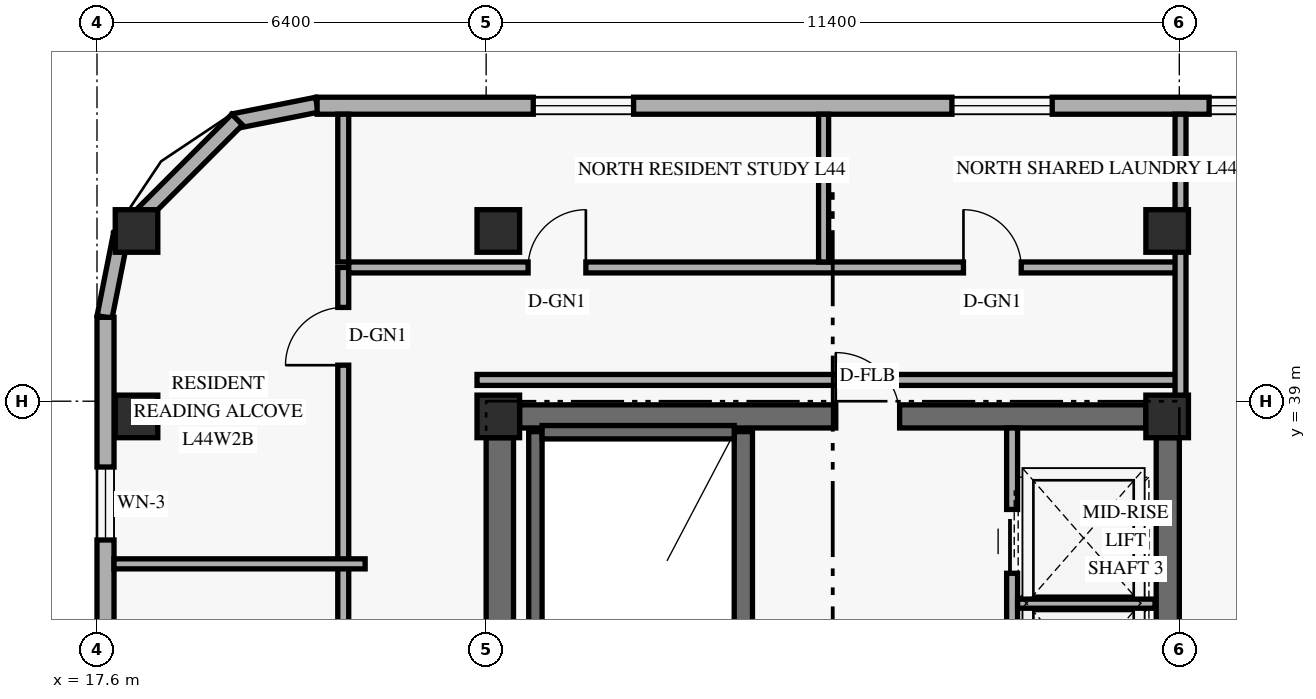
"""IFC4 building model, lengths in metres.
Left out: names, types, materials, properties, quantities, classifications, styles, units other than length and angle.
Written with IfcOpenShell. Run it as: python <this file> out.ifc"""

import sys

from ifc_helpers import new_model, si_unit, direction, frame, frame_2d, origin, origin_2d, place, context, subcontext, project, spatial, rectangle, extrude, element, fill, save


model = new_model("IFC4")
c1 = context("Model", 3, precision=1e-05, world=origin(), true_north=direction((0.0, 1.0)))
c2 = subcontext(c1, "Body", "Model", "MODEL_VIEW")
j1 = project(units=[si_unit("LENGTHUNIT", "METRE"), si_unit("PLANEANGLEUNIT", "RADIAN")], contexts=[c1])
p1 = place(None, origin())
s1 = spatial("IfcSite", under=j1, at=p1, CompositionType="ELEMENT")
p2 = place(p1, origin())
s2 = spatial("IfcBuilding", under=s1, at=p2, CompositionType="ELEMENT")
p3 = place(p2, frame((0.0, 0.0, 169.8)))
s3 = spatial("IfcBuildingStorey", under=s2, at=p3, CompositionType="ELEMENT", Elevation=169.8)
p4 = place(p3, frame((24.225, 30.55, 0.0), z_axis=(0.0, 0.0, 1.0), x_axis=(0.0, 1.0, 0.0)))
e1 = element("IfcWall", 1, at=p4, inside=s3, PredefinedType="SHEAR", context=c2, shape_type="SweptSolid", body=[
    extrude(rectangle(XDim=7.85, YDim=0.45, at=frame_2d((3.925, 0.0))), origin(), (0.0, 0.0, 1.0), 2.738),
])
p5 = place(p3, frame((35.21, 31.35, 0.0), z_axis=(0.0, 0.0, 1.0), x_axis=(0.0, 1.0, 0.0)))
e2 = element("IfcWall", 2, at=p5, inside=s3, PredefinedType="SHEAR", context=c2, shape_type="SweptSolid", body=[
    extrude(rectangle(XDim=7.05, YDim=0.38, at=frame_2d((3.525, 0.0))), origin(), (0.0, 0.0, 1.0), 2.738),
])
p6 = place(p3, frame((24.55, 38.75, 0.0), z_axis=(0.0, 0.0, 1.0), x_axis=(1.0, 0.0, 0.0)))
e3 = element("IfcWall", 3, at=p6, inside=s3, PredefinedType="SHEAR", context=c2, shape_type="SweptSolid", body=[
    extrude(rectangle(XDim=10.3, YDim=0.38, at=frame_2d((5.15, 0.0))), origin(), (0.0, 0.0, 1.0), 3.35),
])
p7 = place(p6, frame((5.2, 0.0, 0.0)))
e4 = element("IfcOpeningElement", 4, at=p7, cuts=e3, PredefinedType="OPENING", context=c2, shape_type="SweptSolid", body=[
    extrude(rectangle(XDim=1.05, YDim=2.15, at=frame_2d((0.525, 1.075))), frame((0.0, 0.2, 0.0), z_axis=(0.0, -1.0, 0.0), x_axis=(1.0, 0.0, 0.0)), (0.0, 0.0, 1.0), 0.4),
])
p8 = place(p3, frame((24.81, 30.74, 0.0), z_axis=(0.0, 0.0, 1.0), x_axis=(0.0, 1.0, 0.0)))
e5 = element("IfcWall", 5, at=p8, inside=s3, PredefinedType="SHEAR", context=c2, shape_type="SweptSolid", body=[
    extrude(rectangle(XDim=7.76, YDim=0.22, at=frame_2d((3.88, 0.0))), origin(), (0.0, 0.0, 1.0), 3.35),
])
p9 = place(p3, frame((28.23, 30.74, 0.0), z_axis=(0.0, 0.0, 1.0), x_axis=(0.0, 1.0, 0.0)))
e6 = element("IfcWall", 6, at=p9, inside=s3, PredefinedType="SHEAR", context=c2, shape_type="SweptSolid", body=[
    extrude(rectangle(XDim=7.76, YDim=0.3, at=frame_2d((3.88, 0.0))), origin(), (0.0, 0.0, 1.0), 3.35),
])
p10 = place(p3, frame((24.92, 38.49, 0.0), z_axis=(0.0, 0.0, 1.0), x_axis=(1.0, 0.0, 0.0)))
e7 = element("IfcWall", 7, at=p10, inside=s3, PredefinedType="SHEAR", context=c2, shape_type="SweptSolid", body=[
    extrude(rectangle(XDim=3.16, YDim=0.22, at=frame_2d((1.58, 0.0))), origin(), (0.0, 0.0, 1.0), 3.35),
])
for number, where, z_axis, x_axis in (
    (8, (18.25, 38.75, 0.0), (0.0, 0.0, 1.0), (1.0, 0.0, 0.0)),
    (9, (18.25, 41.8, 0.0), (0.0, 0.0, 1.0), (1.0, 0.0, 0.0)),
    (10, (24.2, 38.75, 0.0), (0.0, 0.0, 1.0), (1.0, 0.0, 0.0)),
    (11, (24.2, 41.8, 0.0), (0.0, 0.0, 1.0), (1.0, 0.0, 0.0)),
    (12, (35.2, 38.75, 0.0), (0.0, 0.0, 1.0), (1.0, 0.0, 0.0)),
    (13, (35.2, 41.8, 0.0), (0.0, 0.0, 1.0), (1.0, 0.0, 0.0)),
):
    element("IfcColumn", number, at=place(p3, frame(where, z_axis=z_axis, x_axis=x_axis)), inside=s3, PredefinedType="COLUMN", context=c2, shape_type="SweptSolid", body=[
        extrude(rectangle(XDim=0.7, YDim=0.7, at=origin_2d()), origin(), (0.0, 0.0, 1.0), 3.6),
    ])
p11 = place(p3, frame((21.217, 43.876, 0.0), z_axis=(0.0, 0.0, 1.0), x_axis=(-0.980809899341, -0.19496651342, 0.0)))
e14 = element("IfcWall", 14, at=p11, inside=s3, PredefinedType="SOLIDWALL", context=c2, shape_type="SweptSolid", body=[
    extrude(rectangle(XDim=1.389, YDim=0.25, at=frame_2d((0.694, 0.0))), origin(), (0.0, 0.0, 1.0), 3.35),
])
p12 = place(p3, frame((19.905, 43.632, 0.0), z_axis=(0.0, 0.0, 1.0), x_axis=(-0.707106781187, -0.707106781187, 0.0)))
e15 = element("IfcWall", 15, at=p12, inside=s3, PredefinedType="SOLIDWALL", context=c2, shape_type="SweptSolid", body=[
    extrude(rectangle(XDim=2.739, YDim=0.25, at=frame_2d((1.37, 0.0))), origin(), (0.0, 0.0, 1.0), 3.35),
])
p13 = place(p3, frame((17.995, 41.746, 0.0), z_axis=(0.0, 0.0, 1.0), x_axis=(-0.195135625965, -0.9807762678, 0.0)))
e16 = element("IfcWall", 16, at=p13, inside=s3, PredefinedType="SOLIDWALL", context=c2, shape_type="SweptSolid", body=[
    extrude(rectangle(XDim=1.389, YDim=0.25, at=frame_2d((0.694, 0.0))), origin(), (0.0, 0.0, 1.0), 3.35),
])
p14 = place(p3, frame((54.98, 43.86, 0.0), z_axis=(0.0, 0.0, 1.0), x_axis=(-1.0, 0.0, 0.0)))
e17 = element("IfcWall", 17, at=p14, inside=s3, PredefinedType="SOLIDWALL", context=c2, shape_type="SweptSolid", body=[
    extrude(rectangle(XDim=33.76, YDim=0.28, at=frame_2d((16.88, 0.0))), origin(), (0.0, 0.0, 1.0), 3.35),
])
p15 = place(p14, frame((28.555, 0.0, 0.85)))
e18 = element("IfcOpeningElement", 18, at=p15, cuts=e17, PredefinedType="OPENING", context=c2, shape_type="SweptSolid", body=[
    extrude(rectangle(XDim=1.65, YDim=1.6, at=frame_2d((0.825, 0.8))), frame((0.0, 0.15, 0.0), z_axis=(0.0, -1.0, 0.0), x_axis=(1.0, 0.0, 0.0)), (0.0, 0.0, 1.0), 0.3),
])
p16 = place(p14, frame((21.67, 0.0, 0.85)))
e19 = element("IfcOpeningElement", 19, at=p16, cuts=e17, PredefinedType="OPENING", context=c2, shape_type="SweptSolid", body=[
    extrude(rectangle(XDim=1.65, YDim=1.6, at=frame_2d((0.825, 0.8))), frame((0.0, 0.15, 0.0), z_axis=(0.0, -1.0, 0.0), x_axis=(1.0, 0.0, 0.0)), (0.0, 0.0, 1.0), 0.3),
])
p17 = place(p14, frame((17.44, 0.0, 0.85)))
e20 = element("IfcOpeningElement", 20, at=p17, cuts=e17, PredefinedType="OPENING", context=c2, shape_type="SweptSolid", body=[
    extrude(rectangle(XDim=1.65, YDim=1.6, at=frame_2d((0.825, 0.8))), frame((0.0, 0.15, 0.0), z_axis=(0.0, -1.0, 0.0), x_axis=(1.0, 0.0, 0.0)), (0.0, 0.0, 1.0), 0.3),
])
p18 = place(p14, frame((13.245, 0.0, 0.85)))
e21 = element("IfcOpeningElement", 21, at=p18, cuts=e17, PredefinedType="OPENING", context=c2, shape_type="SweptSolid", body=[
    extrude(rectangle(XDim=1.65, YDim=1.6, at=frame_2d((0.825, 0.8))), frame((0.0, 0.15, 0.0), z_axis=(0.0, -1.0, 0.0), x_axis=(1.0, 0.0, 0.0)), (0.0, 0.0, 1.0), 0.3),
])
p19 = place(p14, frame((7.85, 0.0, 0.85)))
e22 = element("IfcOpeningElement", 22, at=p19, cuts=e17, PredefinedType="OPENING", context=c2, shape_type="SweptSolid", body=[
    extrude(rectangle(XDim=1.65, YDim=1.6, at=frame_2d((0.825, 0.8))), frame((0.0, 0.15, 0.0), z_axis=(0.0, -1.0, 0.0), x_axis=(1.0, 0.0, 0.0)), (0.0, 0.0, 1.0), 0.3),
])
p20 = place(p14, frame((4.68, 0.0, 0.85)))
e23 = element("IfcOpeningElement", 23, at=p20, cuts=e17, PredefinedType="OPENING", context=c2, shape_type="SweptSolid", body=[
    extrude(rectangle(XDim=1.2, YDim=1.5, at=frame_2d((0.6, 0.75))), frame((0.0, 0.15, 0.0), z_axis=(0.0, -1.0, 0.0), x_axis=(1.0, 0.0, 0.0)), (0.0, 0.0, 1.0), 0.3),
])
p21 = place(p14, frame((1.365, 0.0, 0.85)))
e24 = element("IfcOpeningElement", 24, at=p21, cuts=e17, PredefinedType="OPENING", context=c2, shape_type="SweptSolid", body=[
    extrude(rectangle(XDim=1.65, YDim=1.6, at=frame_2d((0.825, 0.8))), frame((0.0, 0.15, 0.0), z_axis=(0.0, -1.0, 0.0), x_axis=(1.0, 0.0, 0.0)), (0.0, 0.0, 1.0), 0.3),
])
p22 = place(p3, frame((17.74, 40.38, 0.0), z_axis=(0.0, 0.0, 1.0), x_axis=(0.0, -1.0, 0.0)))
e25 = element("IfcWall", 25, at=p22, inside=s3, PredefinedType="SOLIDWALL", context=c2, shape_type="SweptSolid", body=[
    extrude(rectangle(XDim=32.76, YDim=0.28, at=frame_2d((16.38, 0.0))), origin(), (0.0, 0.0, 1.0), 3.35),
])
p23 = place(p22, frame((26.623, 0.0, 0.85)))
e26 = element("IfcOpeningElement", 26, at=p23, cuts=e25, PredefinedType="OPENING", context=c2, shape_type="SweptSolid", body=[
    extrude(rectangle(XDim=1.8, YDim=1.6, at=frame_2d((0.9, 0.8))), frame((0.0, 0.15, 0.0), z_axis=(0.0, -1.0, 0.0), x_axis=(1.0, 0.0, 0.0)), (0.0, 0.0, 1.0), 0.3),
])
p24 = place(p22, frame((16.085, 0.0, 0.85)))
e27 = element("IfcOpeningElement", 27, at=p24, cuts=e25, PredefinedType="OPENING", context=c2, shape_type="SweptSolid", body=[
    extrude(rectangle(XDim=1.8, YDim=1.6, at=frame_2d((0.9, 0.8))), frame((0.0, 0.15, 0.0), z_axis=(0.0, -1.0, 0.0), x_axis=(1.0, 0.0, 0.0)), (0.0, 0.0, 1.0), 0.3),
])
p25 = place(p22, frame((5.998, 0.0, 0.85)))
e28 = element("IfcOpeningElement", 28, at=p25, cuts=e25, PredefinedType="OPENING", context=c2, shape_type="SweptSolid", body=[
    extrude(rectangle(XDim=1.8, YDim=1.6, at=frame_2d((0.9, 0.8))), frame((0.0, 0.15, 0.0), z_axis=(0.0, -1.0, 0.0), x_axis=(1.0, 0.0, 0.0)), (0.0, 0.0, 1.0), 0.3),
])
p26 = place(p22, frame((2.462, 0.0, 0.85)))
e29 = element("IfcOpeningElement", 29, at=p26, cuts=e25, PredefinedType="OPENING", context=c2, shape_type="SweptSolid", body=[
    extrude(rectangle(XDim=1.2, YDim=1.5, at=frame_2d((0.6, 0.75))), frame((0.0, 0.15, 0.0), z_axis=(0.0, -1.0, 0.0), x_axis=(1.0, 0.0, 0.0)), (0.0, 0.0, 1.0), 0.3),
])
p27 = place(p3, frame((32.65, 31.35, 0.0), z_axis=(0.0, 0.0, 1.0), x_axis=(0.0, 1.0, 0.0)))
e30 = element("IfcWall", 30, at=p27, inside=s3, PredefinedType="STANDARD", context=c2, shape_type="SweptSolid", body=[
    extrude(rectangle(XDim=7.21, YDim=0.18, at=frame_2d((3.605, 0.0))), origin(), (0.0, 0.0, 1.0), 3.35),
])
p28 = place(p27, frame((0.52, 0.0, 0.0)))
e31 = element("IfcOpeningElement", 31, at=p28, cuts=e30, PredefinedType="OPENING", context=c2, shape_type="SweptSolid", body=[
    extrude(rectangle(XDim=1.05, YDim=2.2, at=frame_2d((0.525, 1.1))), frame((0.0, 0.1, 0.0), z_axis=(0.0, -1.0, 0.0), x_axis=(1.0, 0.0, 0.0)), (0.0, 0.0, 1.0), 0.2),
])
p29 = place(p27, frame((2.67, 0.0, 0.0)))
e32 = element("IfcOpeningElement", 32, at=p29, cuts=e30, PredefinedType="OPENING", context=c2, shape_type="SweptSolid", body=[
    extrude(rectangle(XDim=1.05, YDim=2.2, at=frame_2d((0.525, 1.1))), frame((0.0, 0.1, 0.0), z_axis=(0.0, -1.0, 0.0), x_axis=(1.0, 0.0, 0.0)), (0.0, 0.0, 1.0), 0.2),
])
p30 = place(p27, frame((4.82, 0.0, 0.0)))
e33 = element("IfcOpeningElement", 33, at=p30, cuts=e30, PredefinedType="OPENING", context=c2, shape_type="SweptSolid", body=[
    extrude(rectangle(XDim=1.05, YDim=2.2, at=frame_2d((0.525, 1.1))), frame((0.0, 0.1, 0.0), z_axis=(0.0, -1.0, 0.0), x_axis=(1.0, 0.0, 0.0)), (0.0, 0.0, 1.0), 0.2),
])
p31 = place(p3, frame((32.74, 35.67, 0.0), z_axis=(0.0, 0.0, 1.0), x_axis=(1.0, 0.0, 0.0)))
e34 = element("IfcWall", 34, at=p31, inside=s3, PredefinedType="STANDARD", context=c2, shape_type="SweptSolid", body=[
    extrude(rectangle(XDim=2.26, YDim=0.15, at=frame_2d((1.13, 0.0))), origin(), (0.0, 0.0, 1.0), 3.35),
])
p32 = place(p3, frame((21.65, 6.8, 0.0), z_axis=(0.0, 0.0, 1.0), x_axis=(0.0, 1.0, 0.0)))
e35 = element("IfcWall", 35, at=p32, inside=s3, PredefinedType="STANDARD", context=c2, shape_type="SweptSolid", body=[
    extrude(rectangle(XDim=34.4, YDim=0.18, at=frame_2d((17.2, 0.0))), origin(), (0.0, 0.0, 1.0), 2.72),
])
p33 = place(p32, frame((2.883, 0.0, 0.0)))
e36 = element("IfcOpeningElement", 36, at=p33, cuts=e35, PredefinedType="OPENING", context=c2, shape_type="SweptSolid", body=[
    extrude(rectangle(XDim=0.95, YDim=2.15, at=frame_2d((0.475, 1.075))), frame((0.0, 0.1, 0.0), z_axis=(0.0, -1.0, 0.0), x_axis=(1.0, 0.0, 0.0)), (0.0, 0.0, 1.0), 0.2),
])
p34 = place(p32, frame((15.117, 0.0, 0.0)))
e37 = element("IfcOpeningElement", 37, at=p34, cuts=e35, PredefinedType="OPENING", context=c2, shape_type="SweptSolid", body=[
    extrude(rectangle(XDim=0.95, YDim=2.15, at=frame_2d((0.475, 1.075))), frame((0.0, 0.1, 0.0), z_axis=(0.0, -1.0, 0.0), x_axis=(1.0, 0.0, 0.0)), (0.0, 0.0, 1.0), 0.2),
])
p35 = place(p32, frame((25.357, 0.0, 0.0)))
e38 = element("IfcOpeningElement", 38, at=p35, cuts=e35, PredefinedType="OPENING", context=c2, shape_type="SweptSolid", body=[
    extrude(rectangle(XDim=0.95, YDim=2.15, at=frame_2d((0.475, 1.075))), frame((0.0, 0.1, 0.0), z_axis=(0.0, -1.0, 0.0), x_axis=(1.0, 0.0, 0.0)), (0.0, 0.0, 1.0), 0.2),
])
p36 = place(p32, frame((32.792, 0.0, 0.0)))
e39 = element("IfcOpeningElement", 39, at=p36, cuts=e35, PredefinedType="OPENING", context=c2, shape_type="SweptSolid", body=[
    extrude(rectangle(XDim=0.95, YDim=2.15, at=frame_2d((0.475, 1.075))), frame((0.0, 0.1, 0.0), z_axis=(0.0, -1.0, 0.0), x_axis=(1.0, 0.0, 0.0)), (0.0, 0.0, 1.0), 0.2),
])
p37 = place(p3, frame((21.74, 41.2, 0.0), z_axis=(0.0, 0.0, 1.0), x_axis=(1.0, 0.0, 0.0)))
e40 = element("IfcWall", 40, at=p37, inside=s3, PredefinedType="STANDARD", context=c2, shape_type="SweptSolid", body=[
    extrude(rectangle(XDim=13.68, YDim=0.18, at=frame_2d((6.84, 0.0))), origin(), (0.0, 0.0, 1.0), 2.72),
])
p38 = place(p37, frame((2.95, 0.0, 0.0)))
e41 = element("IfcOpeningElement", 41, at=p38, cuts=e40, PredefinedType="OPENING", context=c2, shape_type="SweptSolid", body=[
    extrude(rectangle(XDim=0.95, YDim=2.15, at=frame_2d((0.475, 1.075))), frame((0.0, 0.1, 0.0), z_axis=(0.0, -1.0, 0.0), x_axis=(1.0, 0.0, 0.0)), (0.0, 0.0, 1.0), 0.2),
])
p39 = place(p37, frame((10.11, 0.0, 0.0)))
e42 = element("IfcOpeningElement", 42, at=p39, cuts=e40, PredefinedType="OPENING", context=c2, shape_type="SweptSolid", body=[
    extrude(rectangle(XDim=0.95, YDim=2.15, at=frame_2d((0.475, 1.075))), frame((0.0, 0.1, 0.0), z_axis=(0.0, -1.0, 0.0), x_axis=(1.0, 0.0, 0.0)), (0.0, 0.0, 1.0), 0.2),
])
p40 = place(p3, frame((23.85, 39.35, 0.0), z_axis=(0.0, 0.0, 1.0), x_axis=(1.0, 0.0, 0.0)))
e43 = element("IfcWall", 43, at=p40, inside=s3, PredefinedType="STANDARD", context=c2, shape_type="SweptSolid", body=[
    extrude(rectangle(XDim=11.57, YDim=0.18, at=frame_2d((5.785, 0.0))), origin(), (0.0, 0.0, 1.0), 2.72),
])
p41 = place(p3, frame((21.65, 41.29, 0.0), z_axis=(0.0, 0.0, 1.0), x_axis=(0.0, 1.0, 0.0)))
e44 = element("IfcWall", 44, at=p41, inside=s3, PredefinedType="PARTITIONING", context=c2, shape_type="SweptSolid", body=[
    extrude(rectangle(XDim=2.43, YDim=0.18, at=frame_2d((1.215, 0.0))), origin(), (0.0, 0.0, 1.0), 2.869),
])
p42 = place(p3, frame((35.42, 38.75, 0.0), z_axis=(0.0, 0.0, 1.0), x_axis=(0.0, 1.0, 0.0)))
e45 = element("IfcWall", 45, at=p42, inside=s3, PredefinedType="PARTITIONING", context=c2, shape_type="SweptSolid", body=[
    extrude(rectangle(XDim=4.97, YDim=0.18, at=frame_2d((2.485, 0.0))), origin(), (0.0, 0.0, 1.0), 2.72),
])
p43 = place(p3, frame((17.88, 36.325, 0.0), z_axis=(0.0, 0.0, 1.0), x_axis=(1.0, 0.0, 0.0)))
e46 = element("IfcWall", 46, at=p43, inside=s3, PredefinedType="PARTITIONING", context=c2, shape_type="SweptSolid", body=[
    extrude(rectangle(XDim=4.13, YDim=0.165, at=frame_2d((2.065, 0.0))), origin(), (0.0, 0.0, 1.0), 2.869),
])
p44 = place(p3, frame((29.55, 41.29, 0.0), z_axis=(0.0, 0.0, 1.0), x_axis=(0.0, 1.0, 0.0)))
e47 = element("IfcWall", 47, at=p44, inside=s3, PredefinedType="PARTITIONING", context=c2, shape_type="SweptSolid", body=[
    extrude(rectangle(XDim=2.43, YDim=0.165, at=frame_2d((1.215, 0.0))), origin(), (0.0, 0.0, 1.0), 2.869),
])
p45 = place(p15, origin())
e48 = element("IfcWindow", 48, at=p45, inside=s3, PartitioningType="SINGLE_PANEL", PredefinedType="WINDOW", context=c2, shape_type="SweptSolid", body=[
    extrude(rectangle(XDim=1.65, YDim=1.6, at=frame_2d((0.825, 0.8))), frame((0.0, 0.03, 0.0), z_axis=(0.0, -1.0, 0.0), x_axis=(1.0, 0.0, 0.0)), (0.0, 0.0, 1.0), 0.06),
])
fill(e18, e48)
p46 = place(p16, origin())
e49 = element("IfcWindow", 49, at=p46, inside=s3, PartitioningType="SINGLE_PANEL", PredefinedType="WINDOW", context=c2, shape_type="SweptSolid", body=[
    extrude(rectangle(XDim=1.65, YDim=1.6, at=frame_2d((0.825, 0.8))), frame((0.0, 0.03, 0.0), z_axis=(0.0, -1.0, 0.0), x_axis=(1.0, 0.0, 0.0)), (0.0, 0.0, 1.0), 0.06),
])
fill(e19, e49)
p47 = place(p17, origin())
e50 = element("IfcWindow", 50, at=p47, inside=s3, PartitioningType="SINGLE_PANEL", PredefinedType="WINDOW", context=c2, shape_type="SweptSolid", body=[
    extrude(rectangle(XDim=1.65, YDim=1.6, at=frame_2d((0.825, 0.8))), frame((0.0, 0.03, 0.0), z_axis=(0.0, -1.0, 0.0), x_axis=(1.0, 0.0, 0.0)), (0.0, 0.0, 1.0), 0.06),
])
fill(e20, e50)
p48 = place(p26, origin())
e51 = element("IfcWindow", 51, at=p48, inside=s3, PartitioningType="SINGLE_PANEL", PredefinedType="WINDOW", context=c2, shape_type="SweptSolid", body=[
    extrude(rectangle(XDim=1.2, YDim=1.5, at=frame_2d((0.6, 0.75))), frame((0.0, 0.03, 0.0), z_axis=(0.0, -1.0, 0.0), x_axis=(1.0, 0.0, 0.0)), (0.0, 0.0, 1.0), 0.06),
])
fill(e29, e51)
p49 = place(p30, origin())
e52 = element("IfcDoor", 52, at=p49, inside=s3, OperationType="SLIDING_TO_LEFT", PredefinedType="DOOR", context=c2, shape_type="SweptSolid", body=[
    extrude(rectangle(XDim=1.05, YDim=2.2, at=frame_2d((0.525, 1.1))), frame((0.0, 0.025, 0.0), z_axis=(0.0, -1.0, 0.0), x_axis=(1.0, 0.0, 0.0)), (0.0, 0.0, 1.0), 0.05),
])
fill(e33, e52)
p50 = place(p7, frame((1.05, 0.0, 0.0), z_axis=(0.0, 0.0, 1.0), x_axis=(-1.0, 0.0, 0.0)))
e53 = element("IfcDoor", 53, at=p50, inside=s3, OperationType="SINGLE_SWING_RIGHT", PredefinedType="DOOR", context=c2, shape_type="SweptSolid", body=[
    extrude(rectangle(XDim=1.05, YDim=2.15, at=frame_2d((0.525, 1.075))), frame((0.0, 0.025, 0.0), z_axis=(0.0, -1.0, 0.0), x_axis=(1.0, 0.0, 0.0)), (0.0, 0.0, 1.0), 0.05),
])
fill(e4, e53)
p51 = place(p36, origin())
e54 = element("IfcDoor", 54, at=p51, inside=s3, OperationType="SINGLE_SWING_LEFT", PredefinedType="DOOR", context=c2, shape_type="SweptSolid", body=[
    extrude(rectangle(XDim=0.95, YDim=2.15, at=frame_2d((0.475, 1.075))), frame((0.0, 0.025, 0.0), z_axis=(0.0, -1.0, 0.0), x_axis=(1.0, 0.0, 0.0)), (0.0, 0.0, 1.0), 0.05),
])
fill(e39, e54)
p52 = place(p38, origin())
e55 = element("IfcDoor", 55, at=p52, inside=s3, OperationType="SINGLE_SWING_RIGHT", PredefinedType="DOOR", context=c2, shape_type="SweptSolid", body=[
    extrude(rectangle(XDim=0.95, YDim=2.15, at=frame_2d((0.475, 1.075))), frame((0.0, 0.025, 0.0), z_axis=(0.0, -1.0, 0.0), x_axis=(1.0, 0.0, 0.0)), (0.0, 0.0, 1.0), 0.05),
])
fill(e41, e55)
p53 = place(p39, origin())
e56 = element("IfcDoor", 56, at=p53, inside=s3, OperationType="SINGLE_SWING_LEFT", PredefinedType="DOOR", context=c2, shape_type="SweptSolid", body=[
    extrude(rectangle(XDim=0.95, YDim=2.15, at=frame_2d((0.475, 1.075))), frame((0.0, 0.025, 0.0), z_axis=(0.0, -1.0, 0.0), x_axis=(1.0, 0.0, 0.0)), (0.0, 0.0, 1.0), 0.05),
])
fill(e42, e56)
save(model, sys.argv[1])
